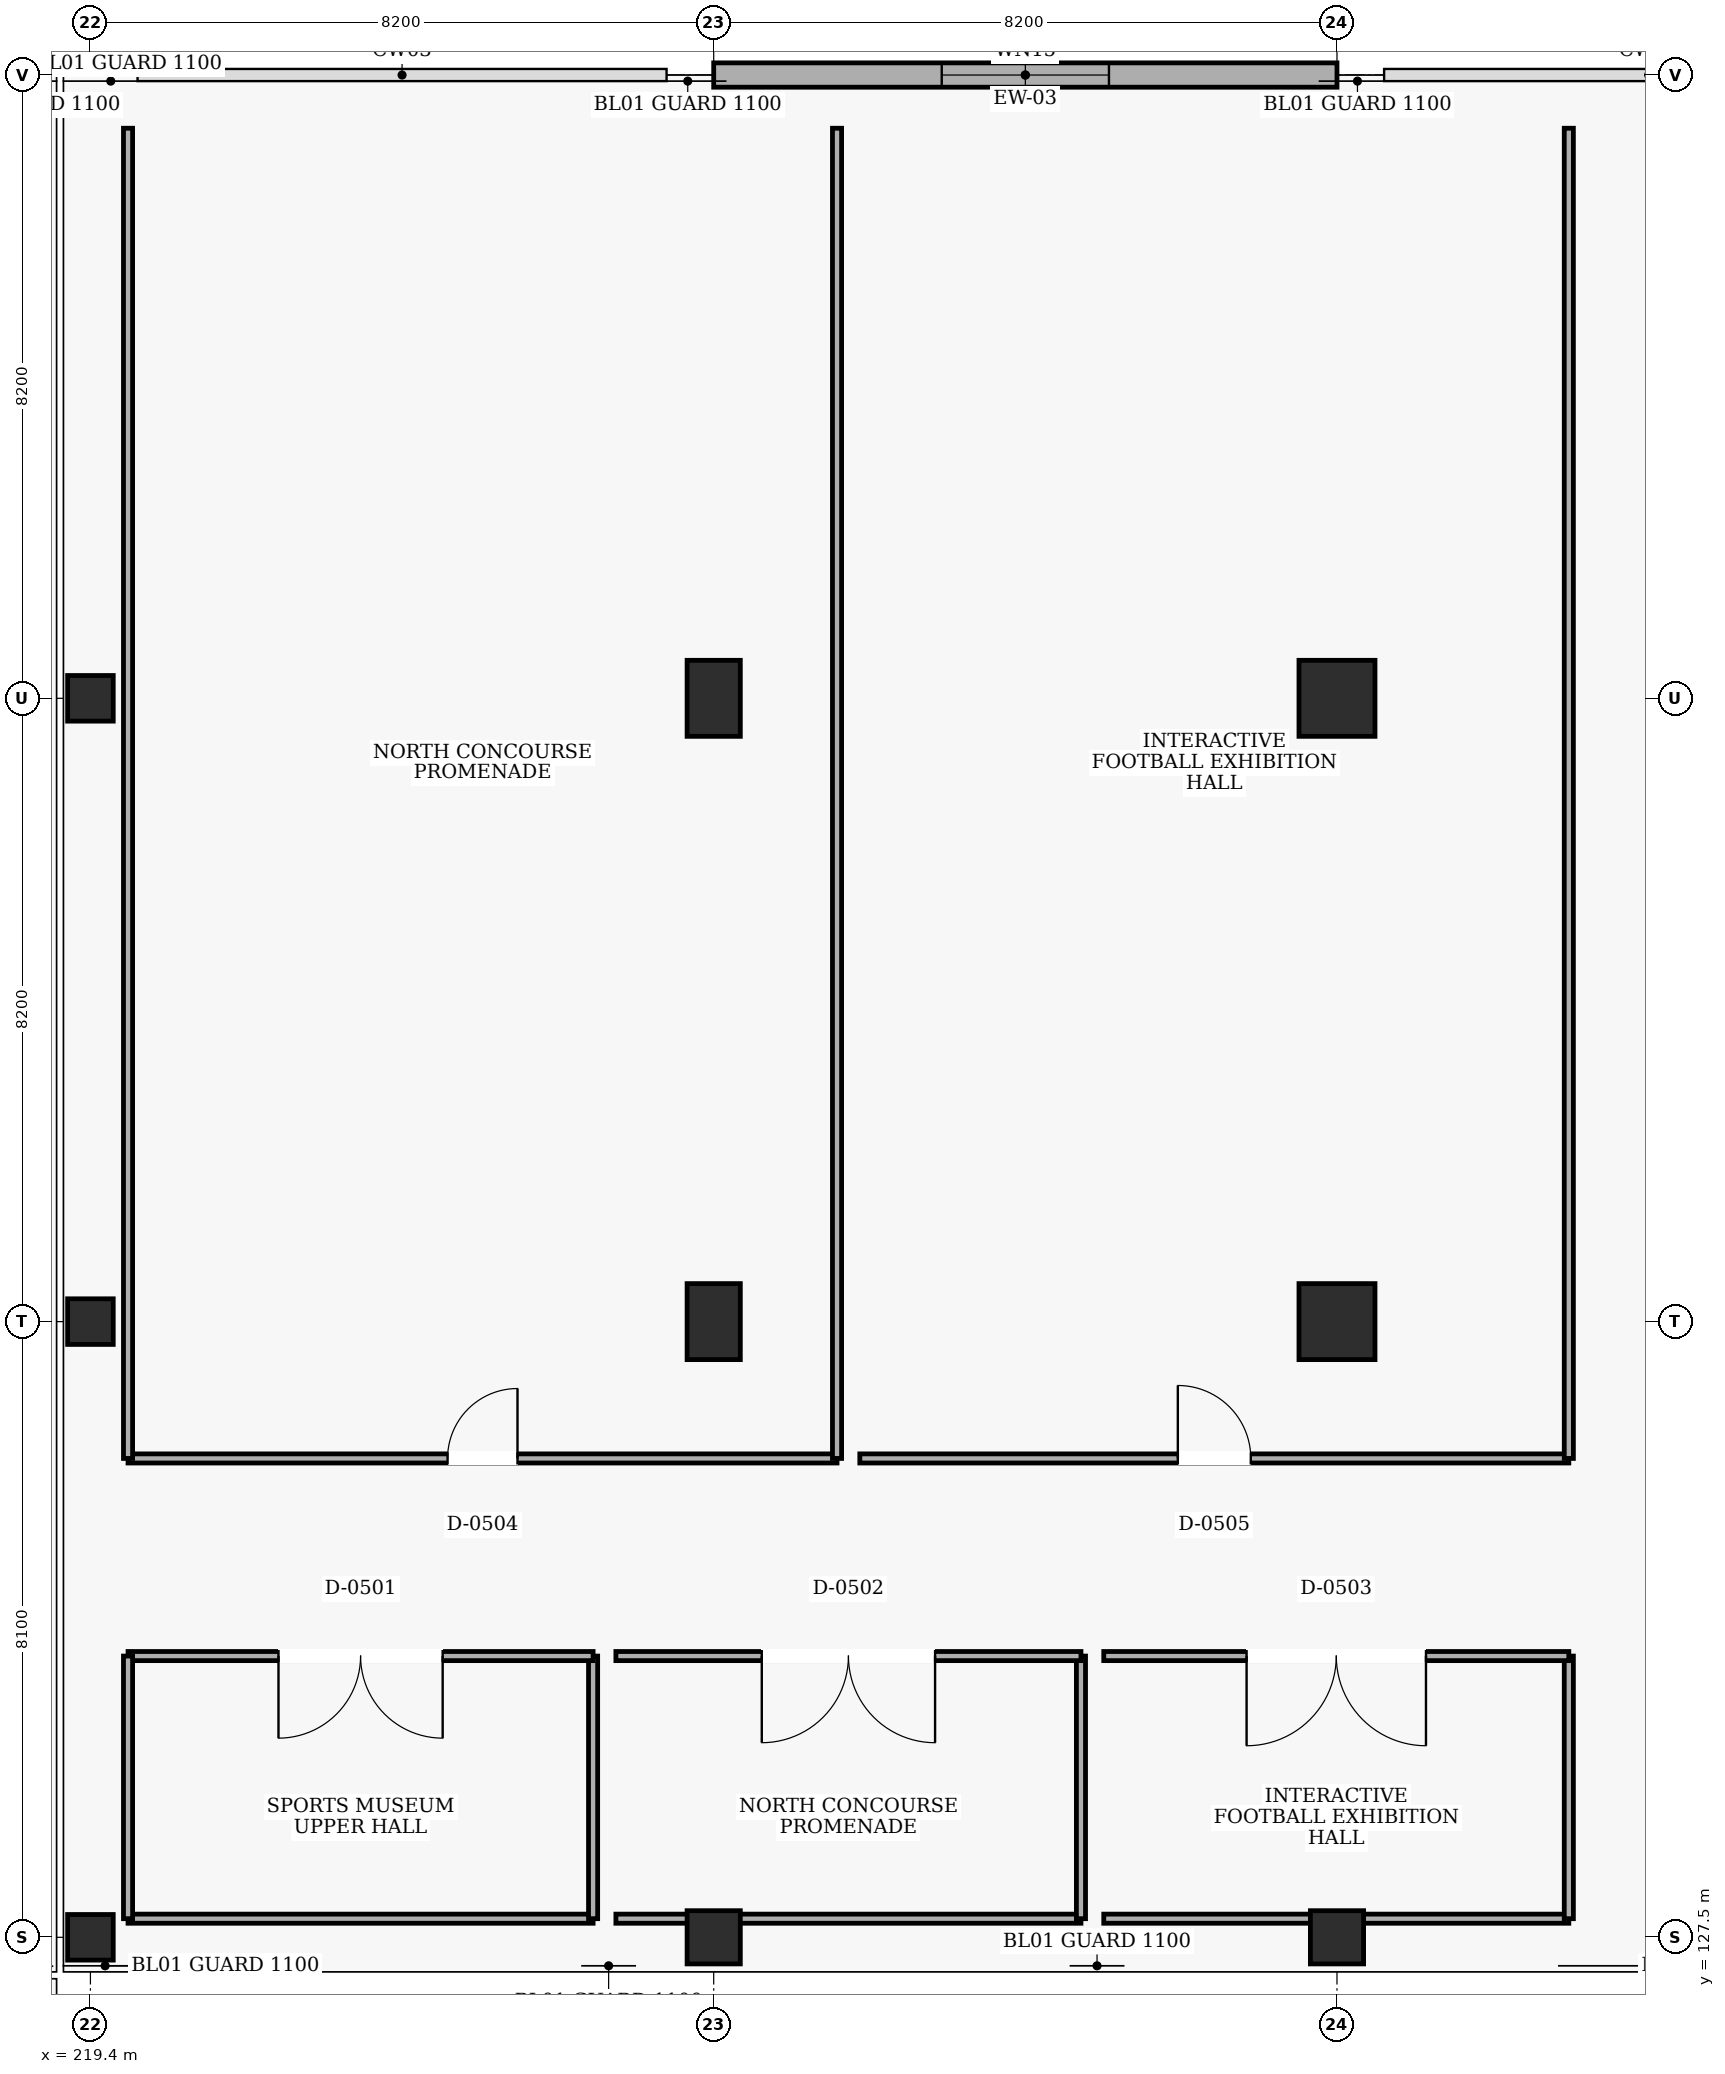
"""IFC4 building model, lengths in metres.
Left out: names, types, materials, properties, quantities, classifications, styles, units other than length and angle.
Written with IfcOpenShell. Run it as: python <this file> out.ifc"""

import sys

from ifc_helpers import new_model, si_unit, direction, frame, frame_2d, origin, origin_2d, place, context, subcontext, project, spatial, rectangle, extrude, element, fill, save


model = new_model("IFC4")
c1 = context("Model", 3, precision=1e-05, world=origin(), true_north=direction((0.0, 1.0)))
c2 = subcontext(c1, "Body", "Model", "MODEL_VIEW")
j1 = project(units=[si_unit("LENGTHUNIT", "METRE"), si_unit("PLANEANGLEUNIT", "RADIAN")], contexts=[c1])
p1 = place(None, origin())
s1 = spatial("IfcSite", under=j1, at=p1, CompositionType="ELEMENT")
p2 = place(p1, origin())
s2 = spatial("IfcBuilding", under=s1, at=p2, CompositionType="ELEMENT")
p3 = place(p2, frame((0.0, 0.0, 5.4)))
s3 = spatial("IfcBuildingStorey", under=s2, at=p3, CompositionType="ELEMENT", Elevation=5.4)
for number, where, z_axis, x_axis in (
    (1, (219.4, 127.5, 0.0), (0.0, 0.0, 1.0), (1.0, 0.0, 0.0)),
    (2, (219.4, 135.6, 0.0), (0.0, 0.0, 1.0), (1.0, 0.0, 0.0)),
    (3, (219.4, 143.8, 0.0), (0.0, 0.0, 1.0), (1.0, 0.0, 0.0)),
):
    element("IfcColumn", number, at=place(p3, frame(where, z_axis=z_axis, x_axis=x_axis)), inside=s3, PredefinedType="COLUMN", context=c2, shape_type="SweptSolid", body=[
        extrude(rectangle(XDim=0.6, YDim=0.6, at=origin_2d()), origin(), (0.0, 0.0, 1.0), 4.8),
    ])
p4 = place(p3, frame((227.6, 127.5, 0.0), z_axis=(0.0, 0.0, 1.0), x_axis=(1.0, 0.0, 0.0)))
e4 = element("IfcColumn", 4, at=p4, inside=s3, PredefinedType="COLUMN", context=c2, shape_type="SweptSolid", body=[
    extrude(rectangle(XDim=0.7, YDim=0.7, at=origin_2d()), origin(), (0.0, 0.0, 1.0), 4.8),
])
for number, where, z_axis, x_axis in (
    (5, (227.6, 135.6, 0.0), (0.0, 0.0, 1.0), (1.0, 0.0, 0.0)),
    (6, (227.6, 143.8, 0.0), (0.0, 0.0, 1.0), (1.0, 0.0, 0.0)),
):
    element("IfcColumn", number, at=place(p3, frame(where, z_axis=z_axis, x_axis=x_axis)), inside=s3, PredefinedType="COLUMN", context=c2, shape_type="SweptSolid", body=[
        extrude(rectangle(XDim=0.7, YDim=1.0, at=origin_2d()), origin(), (0.0, 0.0, 1.0), 4.8),
    ])
p5 = place(p3, frame((235.8, 127.5, 0.0), z_axis=(0.0, 0.0, 1.0), x_axis=(1.0, 0.0, 0.0)))
e7 = element("IfcColumn", 7, at=p5, inside=s3, PredefinedType="COLUMN", context=c2, shape_type="SweptSolid", body=[
    extrude(rectangle(XDim=0.7, YDim=0.7, at=origin_2d()), origin(), (0.0, 0.0, 1.0), 4.8),
])
for number, where, z_axis, x_axis in (
    (8, (235.8, 135.6, 0.0), (0.0, 0.0, 1.0), (1.0, 0.0, 0.0)),
    (9, (235.8, 143.8, 0.0), (0.0, 0.0, 1.0), (1.0, 0.0, 0.0)),
):
    element("IfcColumn", number, at=place(p3, frame(where, z_axis=z_axis, x_axis=x_axis)), inside=s3, PredefinedType="COLUMN", context=c2, shape_type="SweptSolid", body=[
        extrude(rectangle(XDim=1.0, YDim=1.0, at=origin_2d()), origin(), (0.0, 0.0, 1.0), 4.8),
    ])
p6 = place(p3, frame((227.6, 152.0, 0.0), z_axis=(0.0, 0.0, 1.0), x_axis=(1.0, 0.0, 0.0)))
e10 = element("IfcWall", 10, at=p6, inside=s3, PredefinedType="SOLIDWALL", context=c2, shape_type="SweptSolid", body=[
    extrude(rectangle(XDim=8.2, YDim=0.32, at=frame_2d((4.1, 0.0))), origin(), (0.0, 0.0, 1.0), 4.48),
])
p7 = place(p6, frame((3.0, 0.0, 0.9)))
e11 = element("IfcOpeningElement", 11, at=p7, cuts=e10, PredefinedType="OPENING", context=c2, shape_type="SweptSolid", body=[
    extrude(rectangle(XDim=2.2, YDim=2.1, at=frame_2d((1.1, 1.05))), frame((0.0, 0.17, 0.0), z_axis=(0.0, -1.0, 0.0), x_axis=(1.0, 0.0, 0.0)), (0.0, 0.0, 1.0), 0.34),
])
p8 = place(p3, frame((219.895, 127.745, 0.0), z_axis=(0.0, 0.0, 1.0), x_axis=(1.0, 0.0, 0.0)))
e12 = element("IfcWall", 12, at=p8, inside=s3, PredefinedType="PARTITIONING", context=c2, shape_type="SweptSolid", body=[
    extrude(rectangle(XDim=6.118, YDim=0.12, at=frame_2d((3.059, 0.0))), origin(), (0.0, 0.0, 1.0), 3.68),
])
p9 = place(p3, frame((226.013, 127.745, 0.0), z_axis=(0.0, 0.0, 1.0), x_axis=(0.0, 1.0, 0.0)))
e13 = element("IfcWall", 13, at=p9, inside=s3, PredefinedType="PARTITIONING", context=c2, shape_type="SweptSolid", body=[
    extrude(rectangle(XDim=3.455, YDim=0.12, at=frame_2d((1.728, 0.0))), origin(), (0.0, 0.0, 1.0), 4.5),
])
p10 = place(p3, frame((226.013, 131.2, 0.0), z_axis=(0.0, 0.0, 1.0), x_axis=(-1.0, 0.0, 0.0)))
e14 = element("IfcWall", 14, at=p10, inside=s3, PredefinedType="PARTITIONING", context=c2, shape_type="SweptSolid", body=[
    extrude(rectangle(XDim=6.118, YDim=0.12, at=frame_2d((3.059, 0.0))), origin(), (0.0, 0.0, 1.0), 4.5),
])
p11 = place(p10, frame((1.979, 0.0, 0.0)))
e15 = element("IfcOpeningElement", 15, at=p11, cuts=e14, PredefinedType="OPENING", context=c2, shape_type="SweptSolid", body=[
    extrude(rectangle(XDim=2.16, YDim=2.35, at=frame_2d((1.08, 1.175))), frame((0.0, 0.07, 0.0), z_axis=(0.0, -1.0, 0.0), x_axis=(1.0, 0.0, 0.0)), (0.0, 0.0, 1.0), 0.14),
])
p12 = place(p3, frame((219.895, 131.2, 0.0), z_axis=(0.0, 0.0, 1.0), x_axis=(0.0, -1.0, 0.0)))
e16 = element("IfcWall", 16, at=p12, inside=s3, PredefinedType="PARTITIONING", context=c2, shape_type="SweptSolid", body=[
    extrude(rectangle(XDim=3.455, YDim=0.12, at=frame_2d((1.728, 0.0))), origin(), (0.0, 0.0, 1.0), 4.5),
])
p13 = place(p3, frame((226.313, 127.745, 0.0), z_axis=(0.0, 0.0, 1.0), x_axis=(1.0, 0.0, 0.0)))
e17 = element("IfcWall", 17, at=p13, inside=s3, PredefinedType="PARTITIONING", context=c2, shape_type="SweptSolid", body=[
    extrude(rectangle(XDim=6.118, YDim=0.12, at=frame_2d((3.059, 0.0))), origin(), (0.0, 0.0, 1.0), 3.63),
])
p14 = place(p3, frame((232.432, 127.745, 0.0), z_axis=(0.0, 0.0, 1.0), x_axis=(0.0, 1.0, 0.0)))
e18 = element("IfcWall", 18, at=p14, inside=s3, PredefinedType="PARTITIONING", context=c2, shape_type="SweptSolid", body=[
    extrude(rectangle(XDim=3.455, YDim=0.12, at=frame_2d((1.728, 0.0))), origin(), (0.0, 0.0, 1.0), 4.5),
])
p15 = place(p3, frame((232.432, 131.2, 0.0), z_axis=(0.0, 0.0, 1.0), x_axis=(-1.0, 0.0, 0.0)))
e19 = element("IfcWall", 19, at=p15, inside=s3, PredefinedType="PARTITIONING", context=c2, shape_type="SweptSolid", body=[
    extrude(rectangle(XDim=6.118, YDim=0.12, at=frame_2d((3.059, 0.0))), origin(), (0.0, 0.0, 1.0), 4.5),
])
p16 = place(p15, frame((1.919, 0.0, 0.0)))
e20 = element("IfcOpeningElement", 20, at=p16, cuts=e19, PredefinedType="OPENING", context=c2, shape_type="SweptSolid", body=[
    extrude(rectangle(XDim=2.28, YDim=2.4, at=frame_2d((1.14, 1.2))), frame((0.0, 0.07, 0.0), z_axis=(0.0, -1.0, 0.0), x_axis=(1.0, 0.0, 0.0)), (0.0, 0.0, 1.0), 0.14),
])
p17 = place(p3, frame((232.732, 127.745, 0.0), z_axis=(0.0, 0.0, 1.0), x_axis=(1.0, 0.0, 0.0)))
e21 = element("IfcWall", 21, at=p17, inside=s3, PredefinedType="PARTITIONING", context=c2, shape_type="SweptSolid", body=[
    extrude(rectangle(XDim=6.118, YDim=0.12, at=frame_2d((3.059, 0.0))), origin(), (0.0, 0.0, 1.0), 3.63),
])
p18 = place(p3, frame((238.85, 127.745, 0.0), z_axis=(0.0, 0.0, 1.0), x_axis=(0.0, 1.0, 0.0)))
e22 = element("IfcWall", 22, at=p18, inside=s3, PredefinedType="PARTITIONING", context=c2, shape_type="SweptSolid", body=[
    extrude(rectangle(XDim=3.455, YDim=0.12, at=frame_2d((1.728, 0.0))), origin(), (0.0, 0.0, 1.0), 4.5),
])
p19 = place(p3, frame((238.85, 131.2, 0.0), z_axis=(0.0, 0.0, 1.0), x_axis=(-1.0, 0.0, 0.0)))
e23 = element("IfcWall", 23, at=p19, inside=s3, PredefinedType="PARTITIONING", context=c2, shape_type="SweptSolid", body=[
    extrude(rectangle(XDim=6.118, YDim=0.12, at=frame_2d((3.059, 0.0))), origin(), (0.0, 0.0, 1.0), 4.5),
])
p20 = place(p19, frame((1.879, 0.0, 0.0)))
e24 = element("IfcOpeningElement", 24, at=p20, cuts=e23, PredefinedType="OPENING", context=c2, shape_type="SweptSolid", body=[
    extrude(rectangle(XDim=2.36, YDim=2.4, at=frame_2d((1.18, 1.2))), frame((0.0, 0.07, 0.0), z_axis=(0.0, -1.0, 0.0), x_axis=(1.0, 0.0, 0.0)), (0.0, 0.0, 1.0), 0.14),
])
p21 = place(p3, frame((219.895, 133.8, 0.0), z_axis=(0.0, 0.0, 1.0), x_axis=(1.0, 0.0, 0.0)))
e25 = element("IfcWall", 25, at=p21, inside=s3, PredefinedType="PARTITIONING", context=c2, shape_type="SweptSolid", body=[
    extrude(rectangle(XDim=9.327, YDim=0.12, at=frame_2d((4.664, 0.0))), origin(), (0.0, 0.0, 1.0), 4.5),
])
p22 = place(p21, frame((4.204, 0.0, 0.0)))
e26 = element("IfcOpeningElement", 26, at=p22, cuts=e25, PredefinedType="OPENING", context=c2, shape_type="SweptSolid", body=[
    extrude(rectangle(XDim=0.92, YDim=2.1, at=frame_2d((0.46, 1.05))), frame((0.0, 0.07, 0.0), z_axis=(0.0, -1.0, 0.0), x_axis=(1.0, 0.0, 0.0)), (0.0, 0.0, 1.0), 0.14),
])
for number, where, z_axis, x_axis in (
    (27, (229.222, 133.8, 0.0), (0.0, 0.0, 1.0), (0.0, 1.0, 0.0)),
    (28, (219.895, 151.3, 0.0), (0.0, 0.0, 1.0), (0.0, -1.0, 0.0)),
):
    element("IfcWall", number, at=place(p3, frame(where, z_axis=z_axis, x_axis=x_axis)), inside=s3, PredefinedType="PARTITIONING", context=c2, shape_type="SweptSolid", body=[
        extrude(rectangle(XDim=17.5, YDim=0.12, at=frame_2d((8.75, 0.0))), origin(), (0.0, 0.0, 1.0), 4.5),
    ])
p23 = place(p3, frame((229.522, 133.8, 0.0), z_axis=(0.0, 0.0, 1.0), x_axis=(1.0, 0.0, 0.0)))
e29 = element("IfcWall", 29, at=p23, inside=s3, PredefinedType="PARTITIONING", context=c2, shape_type="SweptSolid", body=[
    extrude(rectangle(XDim=9.328, YDim=0.12, at=frame_2d((4.664, 0.0))), origin(), (0.0, 0.0, 1.0), 4.5),
])
p24 = place(p23, frame((4.184, 0.0, 0.0)))
e30 = element("IfcOpeningElement", 30, at=p24, cuts=e29, PredefinedType="OPENING", context=c2, shape_type="SweptSolid", body=[
    extrude(rectangle(XDim=0.96, YDim=2.1, at=frame_2d((0.48, 1.05))), frame((0.0, 0.07, 0.0), z_axis=(0.0, -1.0, 0.0), x_axis=(1.0, 0.0, 0.0)), (0.0, 0.0, 1.0), 0.14),
])
p25 = place(p3, frame((238.85, 133.8, 0.0), z_axis=(0.0, 0.0, 1.0), x_axis=(0.0, 1.0, 0.0)))
e31 = element("IfcWall", 31, at=p25, inside=s3, PredefinedType="PARTITIONING", context=c2, shape_type="SweptSolid", body=[
    extrude(rectangle(XDim=17.5, YDim=0.12, at=frame_2d((8.75, 0.0))), origin(), (0.0, 0.0, 1.0), 4.5),
])
p26 = place(p7, origin())
e32 = element("IfcWindow", 32, at=p26, inside=s3, PartitioningType="SINGLE_PANEL", PredefinedType="WINDOW", context=c2, shape_type="SweptSolid", body=[
    extrude(rectangle(XDim=2.2, YDim=2.1, at=frame_2d((1.1, 1.05))), frame((0.0, 0.03, 0.0), z_axis=(0.0, -1.0, 0.0), x_axis=(1.0, 0.0, 0.0)), (0.0, 0.0, 1.0), 0.06),
])
fill(e11, e32)
p27 = place(p11, origin())
e33 = element("IfcDoor", 33, at=p27, inside=s3, OperationType="DOUBLE_DOOR_SINGLE_SWING", PredefinedType="DOOR", context=c2, shape_type="SweptSolid", body=[
    extrude(rectangle(XDim=2.16, YDim=2.35, at=frame_2d((1.08, 1.175))), frame((0.0, 0.025, 0.0), z_axis=(0.0, -1.0, 0.0), x_axis=(1.0, 0.0, 0.0)), (0.0, 0.0, 1.0), 0.05),
])
fill(e15, e33)
p28 = place(p16, origin())
e34 = element("IfcDoor", 34, at=p28, inside=s3, OperationType="DOUBLE_DOOR_SINGLE_SWING", PredefinedType="DOOR", context=c2, shape_type="SweptSolid", body=[
    extrude(rectangle(XDim=2.28, YDim=2.4, at=frame_2d((1.14, 1.2))), frame((0.0, 0.025, 0.0), z_axis=(0.0, -1.0, 0.0), x_axis=(1.0, 0.0, 0.0)), (0.0, 0.0, 1.0), 0.05),
])
fill(e20, e34)
p29 = place(p20, origin())
e35 = element("IfcDoor", 35, at=p29, inside=s3, OperationType="DOUBLE_DOOR_SINGLE_SWING", PredefinedType="DOOR", context=c2, shape_type="SweptSolid", body=[
    extrude(rectangle(XDim=2.36, YDim=2.4, at=frame_2d((1.18, 1.2))), frame((0.0, 0.025, 0.0), z_axis=(0.0, -1.0, 0.0), x_axis=(1.0, 0.0, 0.0)), (0.0, 0.0, 1.0), 0.05),
])
fill(e24, e35)
p30 = place(p22, origin())
e36 = element("IfcDoor", 36, at=p30, inside=s3, OperationType="SINGLE_SWING_RIGHT", PredefinedType="DOOR", context=c2, shape_type="SweptSolid", body=[
    extrude(rectangle(XDim=0.92, YDim=2.1, at=frame_2d((0.46, 1.05))), frame((0.0, 0.025, 0.0), z_axis=(0.0, -1.0, 0.0), x_axis=(1.0, 0.0, 0.0)), (0.0, 0.0, 1.0), 0.05),
])
fill(e26, e36)
p31 = place(p24, origin())
e37 = element("IfcDoor", 37, at=p31, inside=s3, OperationType="SINGLE_SWING_LEFT", PredefinedType="DOOR", context=c2, shape_type="SweptSolid", body=[
    extrude(rectangle(XDim=0.96, YDim=2.1, at=frame_2d((0.48, 1.05))), frame((0.0, 0.025, 0.0), z_axis=(0.0, -1.0, 0.0), x_axis=(1.0, 0.0, 0.0)), (0.0, 0.0, 1.0), 0.05),
])
fill(e30, e37)
save(model, sys.argv[1])
